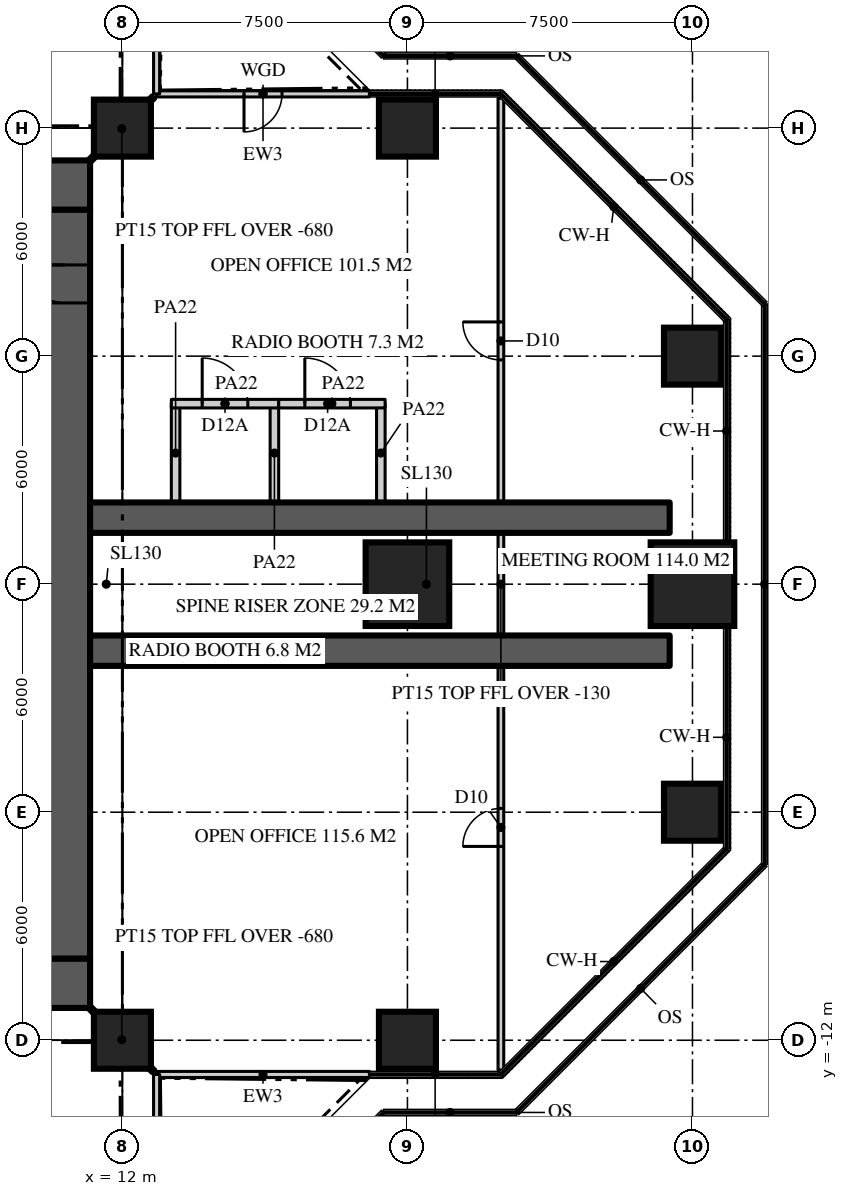
"""IFC4 building model, lengths in metres.
Left out: names, types, materials, properties, quantities, classifications, styles, units other than length and angle.
Written with IfcOpenShell. Run it as: python <this file> out.ifc"""

import sys

from ifc_helpers import new_model, si_unit, direction, frame, frame_2d, origin, origin_2d, place, context, subcontext, project, spatial, rectangle, extrude, element, fill, save


model = new_model("IFC4")
c1 = context("Model", 3, precision=1e-05, world=origin(), true_north=direction((0.0, 1.0)))
c2 = subcontext(c1, "Body", "Model", "MODEL_VIEW")
j1 = project(units=[si_unit("LENGTHUNIT", "METRE"), si_unit("PLANEANGLEUNIT", "RADIAN")], contexts=[c1])
p1 = place(None, origin())
s1 = spatial("IfcSite", under=j1, at=p1, CompositionType="ELEMENT")
p2 = place(p1, origin())
s2 = spatial("IfcBuilding", under=s1, at=p2, CompositionType="ELEMENT")
p3 = place(p2, frame((0.0, 0.0, 208.8)))
s3 = spatial("IfcBuildingStorey", under=s2, at=p3, CompositionType="ELEMENT", Elevation=208.8)
p4 = place(p3, frame((-11.15, 10.5, 0.0), z_axis=(0.0, 0.0, 1.0), x_axis=(1.0, 0.0, 0.0)))
e1 = element("IfcWall", 1, at=p4, inside=s3, PredefinedType="SHEAR", context=c2, shape_type="SweptSolid", body=[
    extrude(rectangle(XDim=22.3, YDim=1.3, at=frame_2d((11.15, 0.0))), origin(), (0.0, 0.0, 1.0), 3.9),
])
p5 = place(p4, frame((4.25, 0.0, 0.0)))
e2 = element("IfcOpeningElement", 2, at=p5, cuts=e1, PredefinedType="OPENING", context=c2, shape_type="SweptSolid", body=[
    extrude(rectangle(XDim=1.8, YDim=2.2, at=frame_2d((0.9, 1.1))), frame((0.0, 0.66, 0.0), z_axis=(0.0, -1.0, 0.0), x_axis=(1.0, 0.0, 0.0)), (0.0, 0.0, 1.0), 1.32),
])
p6 = place(p4, frame((16.25, 0.0, 0.0)))
e3 = element("IfcOpeningElement", 3, at=p6, cuts=e1, PredefinedType="OPENING", context=c2, shape_type="SweptSolid", body=[
    extrude(rectangle(XDim=1.8, YDim=2.2, at=frame_2d((0.9, 1.1))), frame((0.0, 0.66, 0.0), z_axis=(0.0, -1.0, 0.0), x_axis=(1.0, 0.0, 0.0)), (0.0, 0.0, 1.0), 1.32),
])
p7 = place(p3, frame((11.15, -10.5, 0.0), z_axis=(0.0, 0.0, 1.0), x_axis=(-1.0, 0.0, 0.0)))
e4 = element("IfcWall", 4, at=p7, inside=s3, PredefinedType="SHEAR", context=c2, shape_type="SweptSolid", body=[
    extrude(rectangle(XDim=22.3, YDim=1.3, at=frame_2d((11.15, 0.0))), origin(), (0.0, 0.0, 1.0), 3.9),
])
p8 = place(p7, frame((16.25, 0.0, 0.0)))
e5 = element("IfcOpeningElement", 5, at=p8, cuts=e4, PredefinedType="OPENING", context=c2, shape_type="SweptSolid", body=[
    extrude(rectangle(XDim=1.8, YDim=2.2, at=frame_2d((0.9, 1.1))), frame((0.0, 0.66, 0.0), z_axis=(0.0, -1.0, 0.0), x_axis=(1.0, 0.0, 0.0)), (0.0, 0.0, 1.0), 1.32),
])
p9 = place(p7, frame((4.25, 0.0, 0.0)))
e6 = element("IfcOpeningElement", 6, at=p9, cuts=e4, PredefinedType="OPENING", context=c2, shape_type="SweptSolid", body=[
    extrude(rectangle(XDim=1.8, YDim=2.2, at=frame_2d((0.9, 1.1))), frame((0.0, 0.66, 0.0), z_axis=(0.0, -1.0, 0.0), x_axis=(1.0, 0.0, 0.0)), (0.0, 0.0, 1.0), 1.32),
])
p10 = place(p3, frame((10.5, -9.85, 0.0), z_axis=(0.0, 0.0, 1.0), x_axis=(0.0, 1.0, 0.0)))
e7 = element("IfcWall", 7, at=p10, inside=s3, PredefinedType="SHEAR", context=c2, shape_type="SweptSolid", body=[
    extrude(rectangle(XDim=19.7, YDim=1.3, at=frame_2d((9.85, 0.0))), origin(), (0.0, 0.0, 1.0), 3.9),
])
p11 = place(p10, frame((17.25, 0.0, 0.0)))
e8 = element("IfcOpeningElement", 8, at=p11, cuts=e7, PredefinedType="OPENING", context=c2, shape_type="SweptSolid", body=[
    extrude(rectangle(XDim=1.0, YDim=2.2, at=frame_2d((0.5, 1.1))), frame((0.0, 0.66, 0.0), z_axis=(0.0, -1.0, 0.0), x_axis=(1.0, 0.0, 0.0)), (0.0, 0.0, 1.0), 1.32),
])
for number, where, z_axis, x_axis in (
    (9, (11.15, -1.75, 0.0), (0.0, 0.0, 1.0), (1.0, 0.0, 0.0)),
    (10, (11.15, 1.75, 0.0), (0.0, 0.0, 1.0), (1.0, 0.0, 0.0)),
):
    element("IfcWall", number, at=place(p3, frame(where, z_axis=z_axis, x_axis=x_axis)), inside=s3, PredefinedType="SHEAR", context=c2, shape_type="SweptSolid", body=[
        extrude(rectangle(XDim=15.25, YDim=0.8, at=frame_2d((7.625, 0.0))), origin(), (0.0, 0.0, 1.0), 3.9),
    ])
for number, where, z_axis, x_axis in (
    (11, (12.0, -12.0, 0.0), (0.0, 0.0, 1.0), (1.0, 0.0, 0.0)),
    (12, (19.5, -12.0, 0.0), (0.0, 0.0, 1.0), (1.0, 0.0, 0.0)),
    (13, (27.0, -6.0, 0.0), (0.0, 0.0, 1.0), (1.0, 0.0, 0.0)),
):
    element("IfcColumn", number, at=place(p3, frame(where, z_axis=z_axis, x_axis=x_axis)), inside=s3, PredefinedType="COLUMN", context=c2, shape_type="SweptSolid", body=[
        extrude(rectangle(XDim=1.5, YDim=1.5, at=origin_2d()), origin(), (0.0, 0.0, 1.0), 3.9),
    ])
for number, where, z_axis, x_axis in (
    (14, (19.5, 0.0, 0.0), (0.0, 0.0, 1.0), (1.0, 0.0, 0.0)),
    (15, (27.0, 0.0, 0.0), (0.0, 0.0, 1.0), (1.0, 0.0, 0.0)),
):
    element("IfcColumn", number, at=place(p3, frame(where, z_axis=z_axis, x_axis=x_axis)), inside=s3, PredefinedType="COLUMN", context=c2, shape_type="SweptSolid", body=[
        extrude(rectangle(XDim=2.2, YDim=2.2, at=origin_2d()), origin(), (0.0, 0.0, 1.0), 3.9),
    ])
for number, where, z_axis, x_axis in (
    (16, (27.0, 6.0, 0.0), (0.0, 0.0, 1.0), (1.0, 0.0, 0.0)),
    (17, (12.0, 12.0, 0.0), (0.0, 0.0, 1.0), (1.0, 0.0, 0.0)),
    (18, (19.5, 12.0, 0.0), (0.0, 0.0, 1.0), (1.0, 0.0, 0.0)),
):
    element("IfcColumn", number, at=place(p3, frame(where, z_axis=z_axis, x_axis=x_axis)), inside=s3, PredefinedType="COLUMN", context=c2, shape_type="SweptSolid", body=[
        extrude(rectangle(XDim=1.5, YDim=1.5, at=origin_2d()), origin(), (0.0, 0.0, 1.0), 3.9),
    ])
p12 = place(p3, frame((12.9, -12.9, 0.0), z_axis=(0.0, 0.0, 1.0), x_axis=(1.0, 0.0, 0.0)))
e19 = element("IfcWall", 19, at=p12, inside=s3, PredefinedType="SOLIDWALL", context=c2, shape_type="SweptSolid", body=[
    extrude(rectangle(XDim=5.6, YDim=0.16, at=frame_2d((2.8, 0.0))), origin(), (0.0, 0.0, 1.0), 3.77),
])
p13 = place(p3, frame((18.5, 12.9, 0.0), z_axis=(0.0, 0.0, 1.0), x_axis=(-1.0, 0.0, 0.0)))
e20 = element("IfcWall", 20, at=p13, inside=s3, PredefinedType="SOLIDWALL", context=c2, shape_type="SweptSolid", body=[
    extrude(rectangle(XDim=5.6, YDim=0.16, at=frame_2d((2.8, 0.0))), origin(), (0.0, 0.0, 1.0), 3.77),
])
p14 = place(p13, frame((2.3, 0.0, 0.0)))
e21 = element("IfcOpeningElement", 21, at=p14, cuts=e20, PredefinedType="OPENING", context=c2, shape_type="SweptSolid", body=[
    extrude(rectangle(XDim=1.0, YDim=2.2, at=frame_2d((0.5, 1.1))), frame((0.0, 0.09, 0.0), z_axis=(0.0, -1.0, 0.0), x_axis=(1.0, 0.0, 0.0)), (0.0, 0.0, 1.0), 0.18),
])
p15 = place(p3, frame((12.9, 12.9, 0.0), z_axis=(0.0, 0.0, 1.0), x_axis=(0.0, 1.0, 0.0)))
e22 = element("IfcWall", 22, at=p15, inside=s3, PredefinedType="SOLIDWALL", context=c2, shape_type="SweptSolid", body=[
    extrude(rectangle(XDim=5.6, YDim=0.16, at=frame_2d((2.8, 0.0))), origin(), (0.0, 0.0, 1.0), 3.77),
])
p16 = place(p3, frame((12.9, -18.5, 0.0), z_axis=(0.0, 0.0, 1.0), x_axis=(0.0, 1.0, 0.0)))
e23 = element("IfcWall", 23, at=p16, inside=s3, PredefinedType="SOLIDWALL", context=c2, shape_type="SweptSolid", body=[
    extrude(rectangle(XDim=5.6, YDim=0.16, at=frame_2d((2.8, 0.0))), origin(), (0.0, 0.0, 1.0), 3.77),
])
p17 = place(p16, frame((2.3, 0.0, 0.0)))
e24 = element("IfcOpeningElement", 24, at=p17, cuts=e23, PredefinedType="OPENING", context=c2, shape_type="SweptSolid", body=[
    extrude(rectangle(XDim=1.0, YDim=2.2, at=frame_2d((0.5, 1.1))), frame((0.0, 0.09, 0.0), z_axis=(0.0, -1.0, 0.0), x_axis=(1.0, 0.0, 0.0)), (0.0, 0.0, 1.0), 0.18),
])
p18 = place(p3, frame((21.959, -12.786, 0.0), z_axis=(0.0, 0.0, 1.0), x_axis=(0.0, 1.0, 0.0)))
e25 = element("IfcWall", 25, at=p18, inside=s3, PredefinedType="PARTITIONING", context=c2, shape_type="SweptSolid", body=[
    extrude(rectangle(XDim=25.573, YDim=0.15, at=frame_2d((12.786, 0.0))), origin(), (0.0, 0.0, 1.0), 3.77),
])
p19 = place(p18, frame((18.687, 0.0, 0.0)))
e26 = element("IfcOpeningElement", 26, at=p19, cuts=e25, PredefinedType="OPENING", context=c2, shape_type="SweptSolid", body=[
    extrude(rectangle(XDim=1.0, YDim=2.2, at=frame_2d((0.5, 1.1))), frame((0.0, 0.085, 0.0), z_axis=(0.0, -1.0, 0.0), x_axis=(1.0, 0.0, 0.0)), (0.0, 0.0, 1.0), 0.17),
])
p20 = place(p18, frame((5.886, 0.0, 0.0)))
e27 = element("IfcOpeningElement", 27, at=p20, cuts=e25, PredefinedType="OPENING", context=c2, shape_type="SweptSolid", body=[
    extrude(rectangle(XDim=1.0, YDim=2.2, at=frame_2d((0.5, 1.1))), frame((0.0, 0.085, 0.0), z_axis=(0.0, -1.0, 0.0), x_axis=(1.0, 0.0, 0.0)), (0.0, 0.0, 1.0), 0.17),
])
for number, where, z_axis, x_axis in (
    (28, (13.4, 2.15, 0.0), (0.0, 0.0, 1.0), (0.0, 1.0, 0.0)),
    (29, (16.0, 2.15, 0.0), (0.0, 0.0, 1.0), (0.0, 1.0, 0.0)),
):
    element("IfcWall", number, at=place(p3, frame(where, z_axis=z_axis, x_axis=x_axis)), inside=s3, PredefinedType="PARTITIONING", context=c2, shape_type="SweptSolid", body=[
        extrude(rectangle(XDim=2.6, YDim=0.225, at=frame_2d((1.3, 0.0))), origin(), (0.0, 0.0, 1.0), 3.77),
    ])
p21 = place(p3, frame((13.288, 4.75, 0.0), z_axis=(0.0, 0.0, 1.0), x_axis=(1.0, 0.0, 0.0)))
e30 = element("IfcWall", 30, at=p21, inside=s3, PredefinedType="PARTITIONING", context=c2, shape_type="SweptSolid", body=[
    extrude(rectangle(XDim=2.825, YDim=0.225, at=frame_2d((1.413, 0.0))), origin(), (0.0, 0.0, 1.0), 3.77),
])
p22 = place(p21, frame((0.812, 0.0, 0.0)))
e31 = element("IfcOpeningElement", 31, at=p22, cuts=e30, PredefinedType="OPENING", context=c2, shape_type="SweptSolid", body=[
    extrude(rectangle(XDim=1.2, YDim=2.2, at=frame_2d((0.6, 1.1))), frame((0.0, 0.123, 0.0), z_axis=(0.0, -1.0, 0.0), x_axis=(1.0, 0.0, 0.0)), (0.0, 0.0, 1.0), 0.245),
])
p23 = place(p3, frame((18.8, 2.15, 0.0), z_axis=(0.0, 0.0, 1.0), x_axis=(0.0, 1.0, 0.0)))
e32 = element("IfcWall", 32, at=p23, inside=s3, PredefinedType="PARTITIONING", context=c2, shape_type="SweptSolid", body=[
    extrude(rectangle(XDim=2.6, YDim=0.225, at=frame_2d((1.3, 0.0))), origin(), (0.0, 0.0, 1.0), 3.77),
])
p24 = place(p3, frame((16.113, 4.75, 0.0), z_axis=(0.0, 0.0, 1.0), x_axis=(1.0, 0.0, 0.0)))
e33 = element("IfcWall", 33, at=p24, inside=s3, PredefinedType="PARTITIONING", context=c2, shape_type="SweptSolid", body=[
    extrude(rectangle(XDim=2.8, YDim=0.225, at=frame_2d((1.4, 0.0))), origin(), (0.0, 0.0, 1.0), 3.77),
])
p25 = place(p24, frame((0.688, 0.0, 0.0)))
e34 = element("IfcOpeningElement", 34, at=p25, cuts=e33, PredefinedType="OPENING", context=c2, shape_type="SweptSolid", body=[
    extrude(rectangle(XDim=1.2, YDim=2.2, at=frame_2d((0.6, 1.1))), frame((0.0, 0.123, 0.0), z_axis=(0.0, -1.0, 0.0), x_axis=(1.0, 0.0, 0.0)), (0.0, 0.0, 1.0), 0.245),
])
for number, where, z_axis, x_axis in (
    (35, (11.15, 11.15, 0.0), (0.0, 0.0, 1.0), (0.707, 0.707, 0.0)),
    (36, (11.15, -11.15, 0.0), (0.0, 0.0, 1.0), (0.707, -0.707, 0.0)),
):
    element("IfcWall", number, at=place(p3, frame(where, z_axis=z_axis, x_axis=x_axis)), inside=s3, PredefinedType="PARTITIONING", context=c2, shape_type="SweptSolid", body=[
        extrude(rectangle(XDim=2.362, YDim=0.15, at=frame_2d((1.181, 0.0))), origin(), (0.0, 0.0, 1.0), 3.22),
    ])
p26 = place(p14, origin())
e37 = element("IfcDoor", 37, at=p26, inside=s3, OperationType="SINGLE_SWING_RIGHT", PredefinedType="DOOR", context=c2, shape_type="SweptSolid", body=[
    extrude(rectangle(XDim=1.0, YDim=2.2, at=frame_2d((0.5, 1.1))), frame((0.0, 0.025, 0.0), z_axis=(0.0, -1.0, 0.0), x_axis=(1.0, 0.0, 0.0)), (0.0, 0.0, 1.0), 0.05),
])
fill(e21, e37)
p27 = place(p11, origin())
e38 = element("IfcDoor", 38, at=p27, inside=s3, OperationType="SINGLE_SWING_RIGHT", PredefinedType="DOOR", context=c2, shape_type="SweptSolid", body=[
    extrude(rectangle(XDim=1.0, YDim=2.2, at=frame_2d((0.5, 1.1))), frame((0.0, 0.025, 0.0), z_axis=(0.0, -1.0, 0.0), x_axis=(1.0, 0.0, 0.0)), (0.0, 0.0, 1.0), 0.05),
])
fill(e8, e38)
p28 = place(p19, origin())
e39 = element("IfcDoor", 39, at=p28, inside=s3, OperationType="SINGLE_SWING_RIGHT", PredefinedType="DOOR", context=c2, shape_type="SweptSolid", body=[
    extrude(rectangle(XDim=1.0, YDim=2.2, at=frame_2d((0.5, 1.1))), frame((0.0, 0.025, 0.0), z_axis=(0.0, -1.0, 0.0), x_axis=(1.0, 0.0, 0.0)), (0.0, 0.0, 1.0), 0.05),
])
fill(e26, e39)
p29 = place(p20, origin())
e40 = element("IfcDoor", 40, at=p29, inside=s3, OperationType="SINGLE_SWING_LEFT", PredefinedType="DOOR", context=c2, shape_type="SweptSolid", body=[
    extrude(rectangle(XDim=1.0, YDim=2.2, at=frame_2d((0.5, 1.1))), frame((0.0, 0.025, 0.0), z_axis=(0.0, -1.0, 0.0), x_axis=(1.0, 0.0, 0.0)), (0.0, 0.0, 1.0), 0.05),
])
fill(e27, e40)
p30 = place(p22, origin())
e41 = element("IfcDoor", 41, at=p30, inside=s3, OperationType="SINGLE_SWING_LEFT", PredefinedType="DOOR", context=c2, shape_type="SweptSolid", body=[
    extrude(rectangle(XDim=1.2, YDim=2.2, at=frame_2d((0.6, 1.1))), frame((0.0, 0.025, 0.0), z_axis=(0.0, -1.0, 0.0), x_axis=(1.0, 0.0, 0.0)), (0.0, 0.0, 1.0), 0.05),
])
fill(e31, e41)
p31 = place(p25, origin())
e42 = element("IfcDoor", 42, at=p31, inside=s3, OperationType="SINGLE_SWING_LEFT", PredefinedType="DOOR", context=c2, shape_type="SweptSolid", body=[
    extrude(rectangle(XDim=1.2, YDim=2.2, at=frame_2d((0.6, 1.1))), frame((0.0, 0.025, 0.0), z_axis=(0.0, -1.0, 0.0), x_axis=(1.0, 0.0, 0.0)), (0.0, 0.0, 1.0), 0.05),
])
fill(e34, e42)
save(model, sys.argv[1])
